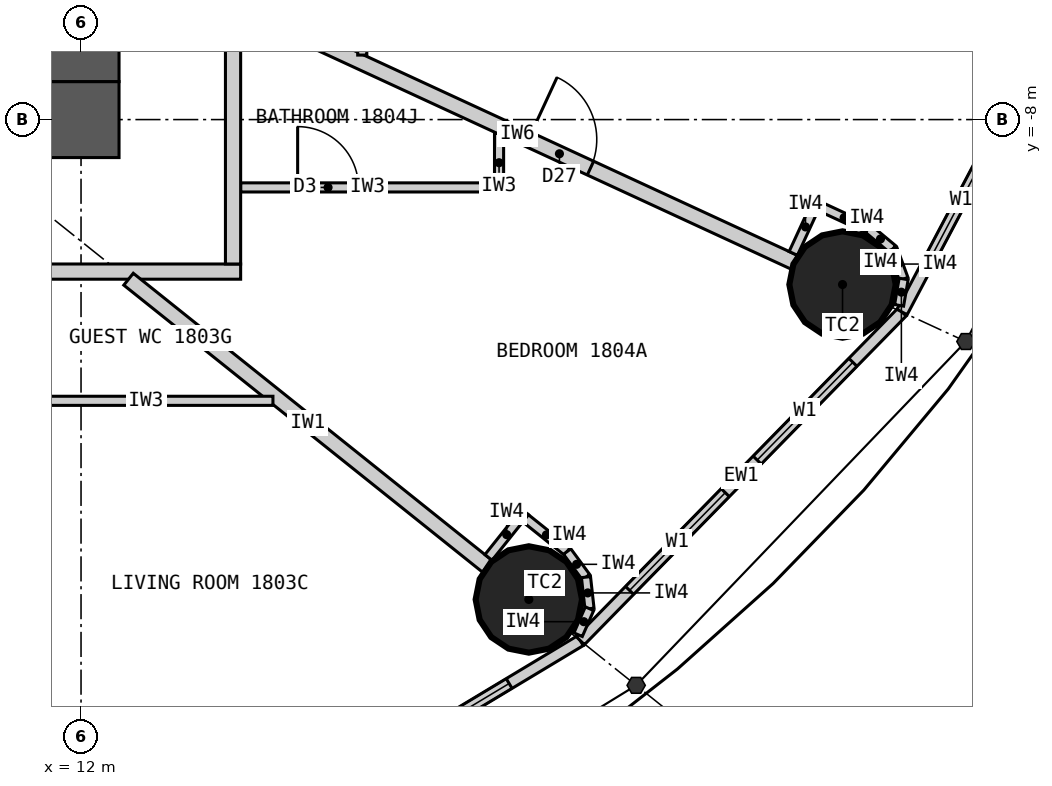
"""IFC4 building model, lengths in metres.
Left out: names, types, materials, properties, quantities, classifications, styles, units other than length and angle.
Written with IfcOpenShell. Run it as: python <this file> out.ifc"""

import sys

from ifc_helpers import new_model, si_unit, direction, frame, frame_2d, origin, origin_2d, place, context, subcontext, project, spatial, rectangle, circle, extrude, element, fill, save


model = new_model("IFC4")
c1 = context("Model", 3, precision=1e-05, world=origin(), true_north=direction((0.0, 1.0)))
c2 = subcontext(c1, "Body", "Model", "MODEL_VIEW")
j1 = project(units=[si_unit("LENGTHUNIT", "METRE"), si_unit("PLANEANGLEUNIT", "RADIAN")], contexts=[c1])
p1 = place(None, origin())
s1 = spatial("IfcSite", under=j1, at=p1, CompositionType="ELEMENT")
p2 = place(p1, origin())
s2 = spatial("IfcBuilding", under=s1, at=p2, CompositionType="ELEMENT")
p3 = place(p2, frame((0.0, 0.0, 73.8)))
s3 = spatial("IfcBuildingStorey", under=s2, at=p3, CompositionType="ELEMENT", Elevation=73.8)
for number, where, z_axis, x_axis in (
    (1, (17.892, -14.313, 0.0), (0.0, 0.0, 1.0), (1.0, 0.0, 0.0)),
    (2, (22.019, -10.17, 0.0), (0.0, 0.0, 1.0), (1.0, 0.0, 0.0)),
):
    element("IfcColumn", number, at=place(p3, frame(where, z_axis=z_axis, x_axis=x_axis)), inside=s3, PredefinedType="COLUMN", context=c2, shape_type="SweptSolid", body=[
        extrude(circle(Radius=0.7, at=origin_2d()), origin(), (0.0, 0.0, 1.0), 3.3),
    ])
p4 = place(p3, frame((12.5, -8.0, 0.0), z_axis=(0.0, 0.0, 1.0), x_axis=(-1.0, 0.0, 0.0)))
e3 = element("IfcWall", 3, at=p4, inside=s3, PredefinedType="SHEAR", context=c2, shape_type="SweptSolid", body=[
    extrude(rectangle(XDim=25.0, YDim=1.0, at=frame_2d((12.5, 0.0))), origin(), (0.0, 0.0, 1.0), 3.3),
])
p5 = place(p4, frame((11.2, 0.0, 0.0)))
e4 = element("IfcOpeningElement", 4, at=p5, cuts=e3, PredefinedType="OPENING", context=c2, shape_type="SweptSolid", body=[
    extrude(rectangle(XDim=1.2, YDim=2.2, at=frame_2d((0.6, 1.1))), frame((0.0, 0.51, 0.0), z_axis=(0.0, -1.0, 0.0), x_axis=(1.0, 0.0, 0.0)), (0.0, 0.0, 1.0), 1.02),
])
p6 = place(p4, frame((18.8, 0.0, 0.0)))
e5 = element("IfcOpeningElement", 5, at=p6, cuts=e3, PredefinedType="OPENING", context=c2, shape_type="SweptSolid", body=[
    extrude(rectangle(XDim=0.9, YDim=2.2, at=frame_2d((0.45, 1.1))), frame((0.0, 0.51, 0.0), z_axis=(0.0, -1.0, 0.0), x_axis=(1.0, 0.0, 0.0)), (0.0, 0.0, 1.0), 1.02),
])
p7 = place(p3, frame((12.0, -7.5, 0.0), z_axis=(0.0, 0.0, 1.0), x_axis=(0.0, 1.0, 0.0)))
e6 = element("IfcWall", 6, at=p7, inside=s3, PredefinedType="SHEAR", context=c2, shape_type="SweptSolid", body=[
    extrude(rectangle(XDim=15.0, YDim=1.0, at=frame_2d((7.5, 0.0))), origin(), (0.0, 0.0, 1.0), 3.3),
])
p8 = place(p7, frame((6.6, 0.0, 0.0)))
e7 = element("IfcOpeningElement", 7, at=p8, cuts=e6, PredefinedType="OPENING", context=c2, shape_type="SweptSolid", body=[
    extrude(rectangle(XDim=1.8, YDim=2.2, at=frame_2d((0.9, 1.1))), frame((0.0, 0.51, 0.0), z_axis=(0.0, -1.0, 0.0), x_axis=(1.0, 0.0, 0.0)), (0.0, 0.0, 1.0), 1.02),
])
p9 = place(p3, frame((13.096, -18.147, 0.0), z_axis=(0.0, 0.0, 1.0), x_axis=(0.856983180864, 0.515344377787, 0.0)))
e8 = element("IfcWall", 8, at=p9, inside=s3, PredefinedType="ELEMENTEDWALL", context=c2, shape_type="SweptSolid", body=[
    extrude(rectangle(XDim=6.386, YDim=0.15, at=frame_2d((3.193, 0.0))), origin(), (0.0, 0.0, 1.0), 3.12),
])
p10 = place(p9, frame((1.093, 0.0, 0.9)))
e9 = element("IfcOpeningElement", 9, at=p10, cuts=e8, PredefinedType="OPENING", context=c2, shape_type="SweptSolid", body=[
    extrude(rectangle(XDim=1.8, YDim=1.9, at=frame_2d((0.9, 0.95))), frame((0.0, 0.085, 0.0), z_axis=(0.0, -1.0, 0.0), x_axis=(1.0, 0.0, 0.0)), (0.0, 0.0, 1.0), 0.17),
])
p11 = place(p9, frame((3.493, 0.0, 0.9)))
e10 = element("IfcOpeningElement", 10, at=p11, cuts=e8, PredefinedType="OPENING", context=c2, shape_type="SweptSolid", body=[
    extrude(rectangle(XDim=1.8, YDim=1.9, at=frame_2d((0.9, 0.95))), frame((0.0, 0.085, 0.0), z_axis=(0.0, -1.0, 0.0), x_axis=(1.0, 0.0, 0.0)), (0.0, 0.0, 1.0), 0.17),
])
p12 = place(p3, frame((18.57, -14.856, 0.0), z_axis=(0.0, 0.0, 1.0), x_axis=(0.699602905915, 0.714531856557, 0.0)))
e11 = element("IfcWall", 11, at=p12, inside=s3, PredefinedType="ELEMENTEDWALL", context=c2, shape_type="SweptSolid", body=[
    extrude(rectangle(XDim=6.051, YDim=0.15, at=frame_2d((3.025, 0.0))), origin(), (0.0, 0.0, 1.0), 3.12),
])
p13 = place(p12, frame((0.926, 0.0, 0.9)))
e12 = element("IfcOpeningElement", 12, at=p13, cuts=e11, PredefinedType="OPENING", context=c2, shape_type="SweptSolid", body=[
    extrude(rectangle(XDim=1.8, YDim=1.9, at=frame_2d((0.9, 0.95))), frame((0.0, 0.085, 0.0), z_axis=(0.0, -1.0, 0.0), x_axis=(1.0, 0.0, 0.0)), (0.0, 0.0, 1.0), 0.17),
])
p14 = place(p12, frame((3.325, 0.0, 0.9)))
e13 = element("IfcOpeningElement", 13, at=p14, cuts=e11, PredefinedType="OPENING", context=c2, shape_type="SweptSolid", body=[
    extrude(rectangle(XDim=1.8, YDim=1.9, at=frame_2d((0.9, 0.95))), frame((0.0, 0.085, 0.0), z_axis=(0.0, -1.0, 0.0), x_axis=(1.0, 0.0, 0.0)), (0.0, 0.0, 1.0), 0.17),
])
p15 = place(p3, frame((22.803, -10.532, 0.0), z_axis=(0.0, 0.0, 1.0), x_axis=(0.467296867008, 0.884100468321, 0.0)))
e14 = element("IfcWall", 14, at=p15, inside=s3, PredefinedType="ELEMENTEDWALL", context=c2, shape_type="SweptSolid", body=[
    extrude(rectangle(XDim=5.734, YDim=0.15, at=frame_2d((2.867, 0.0))), origin(), (0.0, 0.0, 1.0), 3.12),
])
p16 = place(p15, frame((0.767, 0.0, 0.9)))
e15 = element("IfcOpeningElement", 15, at=p16, cuts=e14, PredefinedType="OPENING", context=c2, shape_type="SweptSolid", body=[
    extrude(rectangle(XDim=1.8, YDim=1.9, at=frame_2d((0.9, 0.95))), frame((0.0, 0.085, 0.0), z_axis=(0.0, -1.0, 0.0), x_axis=(1.0, 0.0, 0.0)), (0.0, 0.0, 1.0), 0.17),
])
p17 = place(p15, frame((3.167, 0.0, 0.9)))
e16 = element("IfcOpeningElement", 16, at=p17, cuts=e14, PredefinedType="OPENING", context=c2, shape_type="SweptSolid", body=[
    extrude(rectangle(XDim=1.8, YDim=1.9, at=frame_2d((0.9, 0.95))), frame((0.0, 0.085, 0.0), z_axis=(0.0, -1.0, 0.0), x_axis=(1.0, 0.0, 0.0)), (0.0, 0.0, 1.0), 0.17),
])
p18 = place(p3, frame((14.1, -10.0, 0.0), z_axis=(0.0, 0.0, 1.0), x_axis=(-1.0, 0.0, 0.0)))
e17 = element("IfcWall", 17, at=p18, inside=s3, PredefinedType="PARTITIONING", context=c2, shape_type="SweptSolid", body=[
    extrude(rectangle(XDim=28.2, YDim=0.2, at=frame_2d((14.1, 0.0))), origin(), (0.0, 0.0, 1.0), 3.12),
])
p19 = place(p18, frame((24.165, 0.0, 0.0)))
e18 = element("IfcOpeningElement", 18, at=p19, cuts=e17, PredefinedType="OPENING", context=c2, shape_type="SweptSolid", body=[
    extrude(rectangle(XDim=1.0, YDim=2.2, at=frame_2d((0.5, 1.1))), frame((0.0, 0.11, 0.0), z_axis=(0.0, -1.0, 0.0), x_axis=(1.0, 0.0, 0.0)), (0.0, 0.0, 1.0), 0.22),
])
p20 = place(p18, frame((14.923, 0.0, 0.0)))
e19 = element("IfcOpeningElement", 19, at=p20, cuts=e17, PredefinedType="OPENING", context=c2, shape_type="SweptSolid", body=[
    extrude(rectangle(XDim=1.0, YDim=2.2, at=frame_2d((0.5, 1.1))), frame((0.0, 0.11, 0.0), z_axis=(0.0, -1.0, 0.0), x_axis=(1.0, 0.0, 0.0)), (0.0, 0.0, 1.0), 0.22),
])
p21 = place(p18, frame((3.035, 0.0, 0.0)))
e20 = element("IfcOpeningElement", 20, at=p21, cuts=e17, PredefinedType="OPENING", context=c2, shape_type="SweptSolid", body=[
    extrude(rectangle(XDim=1.0, YDim=2.2, at=frame_2d((0.5, 1.1))), frame((0.0, 0.11, 0.0), z_axis=(0.0, -1.0, 0.0), x_axis=(1.0, 0.0, 0.0)), (0.0, 0.0, 1.0), 0.22),
])
p22 = place(p3, frame((7.289, -10.1, 0.0), z_axis=(0.0, 0.0, 1.0), x_axis=(0.585198353053, -0.810890182197, 0.0)))
e21 = element("IfcWall", 21, at=p22, inside=s3, PredefinedType="PARTITIONING", context=c2, shape_type="SweptSolid", body=[
    extrude(rectangle(XDim=8.36, YDim=0.2, at=frame_2d((4.18, 0.0))), origin(), (0.0, 0.0, 1.0), 2.32),
])
p23 = place(p22, frame((0.72, 0.0, 0.0)))
e22 = element("IfcOpeningElement", 22, at=p23, cuts=e21, PredefinedType="OPENING", context=c2, shape_type="SweptSolid", body=[
    extrude(rectangle(XDim=0.9, YDim=2.1, at=frame_2d((0.45, 1.05))), frame((0.0, 0.11, 0.0), z_axis=(0.0, -1.0, 0.0), x_axis=(1.0, 0.0, 0.0)), (0.0, 0.0, 1.0), 0.22),
])
p24 = place(p3, frame((12.625, -10.1, 0.0), z_axis=(0.0, 0.0, 1.0), x_axis=(0.780892451574, -0.624665493744, 0.0)))
e23 = element("IfcWall", 23, at=p24, inside=s3, PredefinedType="PARTITIONING", context=c2, shape_type="SweptSolid", body=[
    extrude(rectangle(XDim=6.045, YDim=0.2, at=frame_2d((3.022, 0.0))), origin(), (0.0, 0.0, 1.0), 2.32),
])
p25 = place(p3, frame((14.1, -6.512, 0.0), z_axis=(0.0, 0.0, 1.0), x_axis=(0.907832871056, -0.419332181247, 0.0)))
e24 = element("IfcWall", 24, at=p25, inside=s3, PredefinedType="PARTITIONING", context=c2, shape_type="SweptSolid", body=[
    extrude(rectangle(XDim=8.023, YDim=0.2, at=frame_2d((4.011, 0.0))), origin(), (0.0, 0.0, 1.0), 2.32),
])
p26 = place(p25, frame((4.17, 0.0, 0.0)))
e25 = element("IfcOpeningElement", 25, at=p26, cuts=e24, PredefinedType="OPENING", context=c2, shape_type="SweptSolid", body=[
    extrude(rectangle(XDim=0.9, YDim=2.1, at=frame_2d((0.45, 1.05))), frame((0.0, 0.11, 0.0), z_axis=(0.0, -1.0, 0.0), x_axis=(1.0, 0.0, 0.0)), (0.0, 0.0, 1.0), 0.22),
])
p27 = place(p3, frame((14.525, -11.7, 0.0), z_axis=(0.0, 0.0, 1.0), x_axis=(-1.0, 0.0, 0.0)))
e26 = element("IfcWall", 26, at=p27, inside=s3, PredefinedType="PARTITIONING", context=c2, shape_type="SweptSolid", body=[
    extrude(rectangle(XDim=3.34, YDim=0.12, at=frame_2d((1.67, 0.0))), origin(), (0.0, 0.0, 1.0), 3.12),
])
p28 = place(p3, frame((17.5, -8.183, 0.0), z_axis=(0.0, 0.0, 1.0), x_axis=(0.0, -1.0, 0.0)))
e27 = element("IfcWall", 27, at=p28, inside=s3, PredefinedType="PARTITIONING", context=c2, shape_type="SweptSolid", body=[
    extrude(rectangle(XDim=0.77, YDim=0.12, at=frame_2d((0.385, 0.0))), origin(), (0.0, 0.0, 1.0), 3.12),
])
p29 = place(p3, frame((14.1, -8.893, 0.0), z_axis=(0.0, 0.0, 1.0), x_axis=(1.0, 0.0, 0.0)))
e28 = element("IfcWall", 28, at=p29, inside=s3, PredefinedType="PARTITIONING", context=c2, shape_type="SweptSolid", body=[
    extrude(rectangle(XDim=3.34, YDim=0.12, at=frame_2d((1.67, 0.0))), origin(), (0.0, 0.0, 1.0), 3.12),
])
p30 = place(p29, frame((0.75, 0.0, 0.0)))
e29 = element("IfcOpeningElement", 29, at=p30, cuts=e28, PredefinedType="OPENING", context=c2, shape_type="SweptSolid", body=[
    extrude(rectangle(XDim=0.8, YDim=2.1, at=frame_2d((0.4, 1.05))), frame((0.0, 0.07, 0.0), z_axis=(0.0, -1.0, 0.0), x_axis=(1.0, 0.0, 0.0)), (0.0, 0.0, 1.0), 0.14),
])
p31 = place(p3, frame((15.7, -7.152, 0.0), z_axis=(0.0, 0.0, 1.0), x_axis=(0.0, 1.0, 0.0)))
e30 = element("IfcWall", 30, at=p31, inside=s3, PredefinedType="PARTITIONING", context=c2, shape_type="SweptSolid", body=[
    extrude(rectangle(XDim=2.079, YDim=0.12, at=frame_2d((1.04, 0.0))), origin(), (0.0, 0.0, 1.0), 3.12),
])
p32 = place(p3, frame((14.0, -9.9, 0.0), z_axis=(0.0, 0.0, 1.0), x_axis=(0.0, 1.0, 0.0)))
e31 = element("IfcWall", 31, at=p32, inside=s3, PredefinedType="PARTITIONING", context=c2, shape_type="SweptSolid", body=[
    extrude(rectangle(XDim=13.232, YDim=0.2, at=frame_2d((6.616, 0.0))), origin(), (0.0, 0.0, 1.0), 3.12),
])
p33 = place(p32, frame((4.948, 0.0, 0.0)))
e32 = element("IfcOpeningElement", 32, at=p33, cuts=e31, PredefinedType="OPENING", context=c2, shape_type="SweptSolid", body=[
    extrude(rectangle(XDim=1.0, YDim=2.2, at=frame_2d((0.5, 1.1))), frame((0.0, 0.11, 0.0), z_axis=(0.0, -1.0, 0.0), x_axis=(1.0, 0.0, 0.0)), (0.0, 0.0, 1.0), 0.22),
])
p34 = place(p32, frame((8.718, 0.0, 0.0)))
e33 = element("IfcOpeningElement", 33, at=p34, cuts=e31, PredefinedType="OPENING", context=c2, shape_type="SweptSolid", body=[
    extrude(rectangle(XDim=1.0, YDim=2.2, at=frame_2d((0.5, 1.1))), frame((0.0, 0.11, 0.0), z_axis=(0.0, -1.0, 0.0), x_axis=(1.0, 0.0, 0.0)), (0.0, 0.0, 1.0), 0.22),
])
p35 = place(p32, frame((11.74, 0.0, 0.0)))
e34 = element("IfcOpeningElement", 34, at=p35, cuts=e31, PredefinedType="OPENING", context=c2, shape_type="SweptSolid", body=[
    extrude(rectangle(XDim=1.0, YDim=2.2, at=frame_2d((0.5, 1.1))), frame((0.0, 0.11, 0.0), z_axis=(0.0, -1.0, 0.0), x_axis=(1.0, 0.0, 0.0)), (0.0, 0.0, 1.0), 0.22),
])
p36 = place(p3, frame((17.361, -13.76, 0.0), z_axis=(0.0, 0.0, 1.0), x_axis=(0.624501042889, 0.781023973659, 0.0)))
e35 = element("IfcWall", 35, at=p36, inside=s3, PredefinedType="PARTITIONING", context=c2, shape_type="SweptSolid", body=[
    extrude(rectangle(XDim=0.767, YDim=0.12, at=frame_2d((0.384, 0.0))), origin(), (0.0, 0.0, 1.0), 3.12),
])
p37 = place(p3, frame((17.85, -13.246, 0.0), z_axis=(0.0, 0.0, 1.0), x_axis=(0.780902834923, -0.62465251333, 0.0)))
e36 = element("IfcWall", 36, at=p37, inside=s3, PredefinedType="PARTITIONING", context=c2, shape_type="SweptSolid", body=[
    extrude(rectangle(XDim=0.7, YDim=0.12, at=frame_2d((0.35, 0.0))), origin(), (0.0, 0.0, 1.0), 3.12),
])
for number, where, z_axis, x_axis in (
    (37, (18.396, -13.683, 0.0), (0.0, 0.0, 1.0), (0.592, -0.806, 0.0)),
    (38, (18.644, -14.02, 0.0), (0.0, 0.0, 1.0), (0.11, -0.994, 0.0)),
):
    element("IfcWall", number, at=place(p3, frame(where, z_axis=z_axis, x_axis=x_axis)), inside=s3, PredefinedType="PARTITIONING", context=c2, shape_type="SweptSolid", body=[
        extrude(rectangle(XDim=0.418, YDim=0.12, at=frame_2d((0.209, 0.0))), origin(), (0.0, 0.0, 1.0), 3.12),
    ])
p38 = place(p3, frame((18.69, -14.435, 0.0), z_axis=(0.0, 0.0, 1.0), x_axis=(-0.401093412634, -0.91603715773, 0.0)))
e39 = element("IfcWall", 39, at=p38, inside=s3, PredefinedType="PARTITIONING", context=c2, shape_type="SweptSolid", body=[
    extrude(rectangle(XDim=0.373, YDim=0.12, at=frame_2d((0.187, 0.0))), origin(), (0.0, 0.0, 1.0), 3.12),
])
p39 = place(p3, frame((21.371, -9.761, 0.0), z_axis=(0.0, 0.0, 1.0), x_axis=(0.419259891039, 0.907866258744, 0.0)))
e40 = element("IfcWall", 40, at=p39, inside=s3, PredefinedType="PARTITIONING", context=c2, shape_type="SweptSolid", body=[
    extrude(rectangle(XDim=0.768, YDim=0.12, at=frame_2d((0.384, 0.0))), origin(), (0.0, 0.0, 1.0), 3.12),
])
p40 = place(p3, frame((21.722, -9.144, 0.0), z_axis=(0.0, 0.0, 1.0), x_axis=(0.907877701396, -0.419235112208, 0.0)))
e41 = element("IfcWall", 41, at=p40, inside=s3, PredefinedType="PARTITIONING", context=c2, shape_type="SweptSolid", body=[
    extrude(rectangle(XDim=0.7, YDim=0.12, at=frame_2d((0.35, 0.0))), origin(), (0.0, 0.0, 1.0), 3.12),
])
p41 = place(p3, frame((22.358, -9.437, 0.0), z_axis=(0.0, 0.0, 1.0), x_axis=(0.768412687942, -0.639954639806, 0.0)))
e42 = element("IfcWall", 42, at=p41, inside=s3, PredefinedType="PARTITIONING", context=c2, shape_type="SweptSolid", body=[
    extrude(rectangle(XDim=0.418, YDim=0.12, at=frame_2d((0.209, 0.0))), origin(), (0.0, 0.0, 1.0), 3.12),
])
p42 = place(p3, frame((22.679, -9.705, 0.0), z_axis=(0.0, 0.0, 1.0), x_axis=(0.345164001646, -0.938542386879, 0.0)))
e43 = element("IfcWall", 43, at=p42, inside=s3, PredefinedType="PARTITIONING", context=c2, shape_type="SweptSolid", body=[
    extrude(rectangle(XDim=0.418, YDim=0.12, at=frame_2d((0.209, 0.0))), origin(), (0.0, 0.0, 1.0), 3.12),
])
p43 = place(p3, frame((22.823, -10.097, 0.0), z_axis=(0.0, 0.0, 1.0), x_axis=(-0.169674995186, -0.985500074079, 0.0)))
e44 = element("IfcWall", 44, at=p43, inside=s3, PredefinedType="PARTITIONING", context=c2, shape_type="SweptSolid", body=[
    extrude(rectangle(XDim=0.353, YDim=0.12, at=frame_2d((0.176, 0.0))), origin(), (0.0, 0.0, 1.0), 3.12),
])
p44 = place(p11, origin())
e45 = element("IfcWindow", 45, at=p44, inside=s3, PartitioningType="SINGLE_PANEL", PredefinedType="WINDOW", context=c2, shape_type="SweptSolid", body=[
    extrude(rectangle(XDim=1.8, YDim=1.9, at=frame_2d((0.9, 0.95))), frame((0.0, 0.03, 0.0), z_axis=(0.0, -1.0, 0.0), x_axis=(1.0, 0.0, 0.0)), (0.0, 0.0, 1.0), 0.06),
])
fill(e10, e45)
p45 = place(p13, origin())
e46 = element("IfcWindow", 46, at=p45, inside=s3, PartitioningType="SINGLE_PANEL", PredefinedType="WINDOW", context=c2, shape_type="SweptSolid", body=[
    extrude(rectangle(XDim=1.8, YDim=1.9, at=frame_2d((0.9, 0.95))), frame((0.0, 0.03, 0.0), z_axis=(0.0, -1.0, 0.0), x_axis=(1.0, 0.0, 0.0)), (0.0, 0.0, 1.0), 0.06),
])
fill(e12, e46)
p46 = place(p14, origin())
e47 = element("IfcWindow", 47, at=p46, inside=s3, PartitioningType="SINGLE_PANEL", PredefinedType="WINDOW", context=c2, shape_type="SweptSolid", body=[
    extrude(rectangle(XDim=1.8, YDim=1.9, at=frame_2d((0.9, 0.95))), frame((0.0, 0.03, 0.0), z_axis=(0.0, -1.0, 0.0), x_axis=(1.0, 0.0, 0.0)), (0.0, 0.0, 1.0), 0.06),
])
fill(e13, e47)
p47 = place(p16, origin())
e48 = element("IfcWindow", 48, at=p47, inside=s3, PartitioningType="SINGLE_PANEL", PredefinedType="WINDOW", context=c2, shape_type="SweptSolid", body=[
    extrude(rectangle(XDim=1.8, YDim=1.9, at=frame_2d((0.9, 0.95))), frame((0.0, 0.03, 0.0), z_axis=(0.0, -1.0, 0.0), x_axis=(1.0, 0.0, 0.0)), (0.0, 0.0, 1.0), 0.06),
])
fill(e15, e48)
p48 = place(p30, origin())
e49 = element("IfcDoor", 49, at=p48, inside=s3, OperationType="SINGLE_SWING_LEFT", PredefinedType="DOOR", context=c2, shape_type="SweptSolid", body=[
    extrude(rectangle(XDim=0.8, YDim=2.1, at=frame_2d((0.4, 1.05))), frame((0.0, 0.025, 0.0), z_axis=(0.0, -1.0, 0.0), x_axis=(1.0, 0.0, 0.0)), (0.0, 0.0, 1.0), 0.05),
])
fill(e29, e49)
p49 = place(p26, origin())
e50 = element("IfcDoor", 50, at=p49, inside=s3, OperationType="SINGLE_SWING_LEFT", PredefinedType="DOOR", context=c2, shape_type="SweptSolid", body=[
    extrude(rectangle(XDim=0.9, YDim=2.1, at=frame_2d((0.45, 1.05))), frame((0.0, 0.025, 0.0), z_axis=(0.0, -1.0, 0.0), x_axis=(1.0, 0.0, 0.0)), (0.0, 0.0, 1.0), 0.05),
])
fill(e25, e50)
save(model, sys.argv[1])
